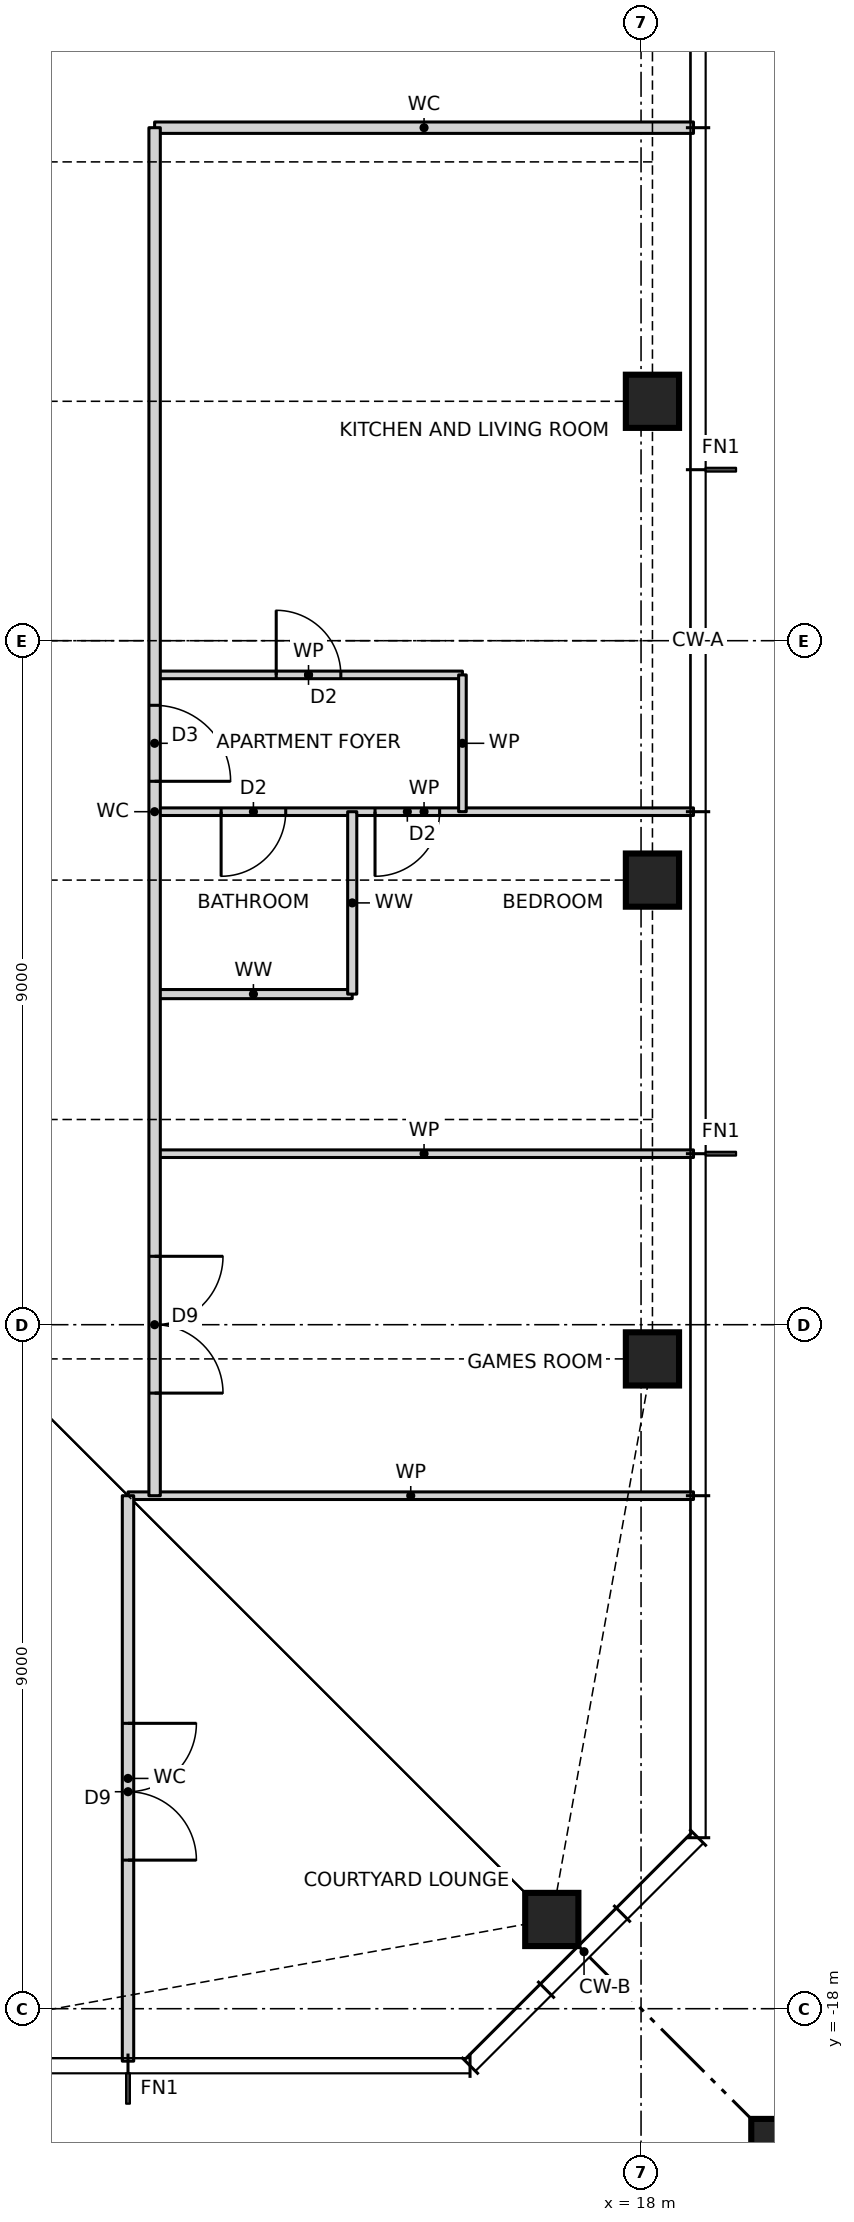
"""IFC4 building model, lengths in metres.
Left out: names, types, materials, properties, quantities, classifications, styles, units other than length and angle.
Written with IfcOpenShell. Run it as: python <this file> out.ifc"""

import sys

from ifc_helpers import new_model, si_unit, direction, frame, frame_2d, origin, origin_2d, place, context, subcontext, project, spatial, rectangle, hollow_rectangle, i_section, extrude, element, fill, save


model = new_model("IFC4")
c1 = context("Model", 3, precision=1e-05, world=origin(), true_north=direction((0.0, 1.0)))
c2 = subcontext(c1, "Body", "Model", "MODEL_VIEW")
j1 = project(units=[si_unit("LENGTHUNIT", "METRE"), si_unit("PLANEANGLEUNIT", "RADIAN")], contexts=[c1])
p1 = place(None, origin())
s1 = spatial("IfcSite", under=j1, at=p1, CompositionType="ELEMENT")
p2 = place(p1, origin())
s2 = spatial("IfcBuilding", under=s1, at=p2, CompositionType="ELEMENT")
p3 = place(p2, frame((0.0, 0.0, 184.5)))
s3 = spatial("IfcBuildingStorey", under=s2, at=p3, CompositionType="ELEMENT", Elevation=184.5)
for number, where, z_axis, x_axis in (
    (1, (16.826, -16.826, 0.0), (0.0, 0.0, 1.0), (1.0, 0.0, 0.0)),
    (2, (18.15, -9.45, 0.0), (0.0, 0.0, 1.0), (1.0, 0.0, 0.0)),
    (3, (18.15, -3.15, 0.0), (0.0, 0.0, 1.0), (1.0, 0.0, 0.0)),
    (4, (18.15, 3.15, 0.0), (0.0, 0.0, 1.0), (1.0, 0.0, 0.0)),
):
    element("IfcColumn", number, at=place(p3, frame(where, z_axis=z_axis, x_axis=x_axis)), inside=s3, PredefinedType="COLUMN", context=c2, shape_type="SweptSolid", body=[
        extrude(hollow_rectangle(XDim=0.7, YDim=0.7, WallThickness=0.06, at=origin_2d()), origin(), (0.0, 0.0, 1.0), 3.5),
    ])
p4 = place(p3, frame((21.65, -21.65, 0.0), z_axis=(0.0, 0.0, 1.0), x_axis=(1.0, 0.0, 0.0)))
e5 = element("IfcColumn", 5, at=p4, inside=s3, PredefinedType="COLUMN", context=c2, shape_type="SweptSolid", body=[
    extrude(rectangle(XDim=4.4, YDim=4.4, at=origin_2d()), origin(), (0.0, 0.0, 1.0), 3.5),
    extrude(i_section(OverallWidth=0.478, OverallDepth=0.599, WebThickness=0.1, FlangeThickness=0.14, at=origin_2d()), origin(), (0.0, 0.0, 1.0), 3.5),
])
p5 = place(p3, frame((11.25, -11.25, 0.0), z_axis=(0.0, 0.0, 1.0), x_axis=(1.0, 0.0, 0.0)))
e6 = element("IfcWall", 6, at=p5, inside=s3, PredefinedType="PARTITIONING", context=c2, shape_type="SweptSolid", body=[
    extrude(rectangle(XDim=7.44, YDim=0.1, at=frame_2d((3.72, 0.0))), origin(), (0.0, 0.0, 1.0), 3.27),
])
p6 = place(p3, frame((11.6, -6.75, 0.0), z_axis=(0.0, 0.0, 1.0), x_axis=(1.0, 0.0, 0.0)))
e7 = element("IfcWall", 7, at=p6, inside=s3, PredefinedType="PARTITIONING", context=c2, shape_type="SweptSolid", body=[
    extrude(rectangle(XDim=7.09, YDim=0.1, at=frame_2d((3.545, 0.0))), origin(), (0.0, 0.0, 1.0), 3.27),
])
p7 = place(p3, frame((11.6, -4.65, 0.0), z_axis=(0.0, 0.0, 1.0), x_axis=(1.0, 0.0, 0.0)))
e8 = element("IfcWall", 8, at=p7, inside=s3, PredefinedType="PARTITIONING", context=c2, shape_type="SweptSolid", body=[
    extrude(rectangle(XDim=2.6, YDim=0.12, at=frame_2d((1.3, 0.0))), origin(), (0.0, 0.0, 1.0), 3.27),
])
p8 = place(p3, frame((11.6, -2.25, 0.0), z_axis=(0.0, 0.0, 1.0), x_axis=(1.0, 0.0, 0.0)))
e9 = element("IfcWall", 9, at=p8, inside=s3, PredefinedType="PARTITIONING", context=c2, shape_type="SweptSolid", body=[
    extrude(rectangle(XDim=7.09, YDim=0.1, at=frame_2d((3.545, 0.0))), origin(), (0.0, 0.0, 1.0), 3.27),
])
p9 = place(p8, frame((2.9, 0.0, 0.0)))
e10 = element("IfcOpeningElement", 10, at=p9, cuts=e9, PredefinedType="OPENING", context=c2, shape_type="SweptSolid", body=[
    extrude(rectangle(XDim=0.85, YDim=2.1, at=frame_2d((0.425, 1.05))), frame((0.0, 0.06, 0.0), z_axis=(0.0, -1.0, 0.0), x_axis=(1.0, 0.0, 0.0)), (0.0, 0.0, 1.0), 0.12),
])
p10 = place(p8, frame((0.875, 0.0, 0.0)))
e11 = element("IfcOpeningElement", 11, at=p10, cuts=e9, PredefinedType="OPENING", context=c2, shape_type="SweptSolid", body=[
    extrude(rectangle(XDim=0.85, YDim=2.1, at=frame_2d((0.425, 1.05))), frame((0.0, 0.06, 0.0), z_axis=(0.0, -1.0, 0.0), x_axis=(1.0, 0.0, 0.0)), (0.0, 0.0, 1.0), 0.12),
])
p11 = place(p3, frame((11.6, -0.45, 0.0), z_axis=(0.0, 0.0, 1.0), x_axis=(1.0, 0.0, 0.0)))
e12 = element("IfcWall", 12, at=p11, inside=s3, PredefinedType="PARTITIONING", context=c2, shape_type="SweptSolid", body=[
    extrude(rectangle(XDim=4.05, YDim=0.1, at=frame_2d((2.025, 0.0))), origin(), (0.0, 0.0, 1.0), 3.27),
])
p12 = place(p11, frame((1.6, 0.0, 0.0)))
e13 = element("IfcOpeningElement", 13, at=p12, cuts=e12, PredefinedType="OPENING", context=c2, shape_type="SweptSolid", body=[
    extrude(rectangle(XDim=0.85, YDim=2.1, at=frame_2d((0.425, 1.05))), frame((0.0, 0.06, 0.0), z_axis=(0.0, -1.0, 0.0), x_axis=(1.0, 0.0, 0.0)), (0.0, 0.0, 1.0), 0.12),
])
p13 = place(p3, frame((11.6, 6.75, 0.0), z_axis=(0.0, 0.0, 1.0), x_axis=(1.0, 0.0, 0.0)))
e14 = element("IfcWall", 14, at=p13, inside=s3, PredefinedType="PARTITIONING", context=c2, shape_type="SweptSolid", body=[
    extrude(rectangle(XDim=7.09, YDim=0.15, at=frame_2d((3.545, 0.0))), origin(), (0.0, 0.0, 1.0), 3.27),
])
p14 = place(p3, frame((15.65, -2.25, 0.0), z_axis=(0.0, 0.0, 1.0), x_axis=(0.0, 1.0, 0.0)))
e15 = element("IfcWall", 15, at=p14, inside=s3, PredefinedType="PARTITIONING", context=c2, shape_type="SweptSolid", body=[
    extrude(rectangle(XDim=1.8, YDim=0.1, at=frame_2d((0.9, 0.0))), origin(), (0.0, 0.0, 1.0), 3.27),
])
p15 = place(p3, frame((14.2, -4.65, 0.0), z_axis=(0.0, 0.0, 1.0), x_axis=(0.0, 1.0, 0.0)))
e16 = element("IfcWall", 16, at=p15, inside=s3, PredefinedType="PARTITIONING", context=c2, shape_type="SweptSolid", body=[
    extrude(rectangle(XDim=2.4, YDim=0.12, at=frame_2d((1.2, 0.0))), origin(), (0.0, 0.0, 1.0), 3.27),
])
p16 = place(p3, frame((11.6, -11.25, 0.0), z_axis=(0.0, 0.0, 1.0), x_axis=(0.0, 1.0, 0.0)))
e17 = element("IfcWall", 17, at=p16, inside=s3, PredefinedType="PARTITIONING", context=c2, shape_type="SweptSolid", body=[
    extrude(rectangle(XDim=18.0, YDim=0.15, at=frame_2d((9.0, 0.0))), origin(), (0.0, 0.0, 1.0), 3.27),
])
p17 = place(p16, frame((1.35, 0.0, 0.0)))
e18 = element("IfcOpeningElement", 18, at=p17, cuts=e17, PredefinedType="OPENING", context=c2, shape_type="SweptSolid", body=[
    extrude(rectangle(XDim=1.8, YDim=2.1, at=frame_2d((0.9, 1.05))), frame((0.0, 0.085, 0.0), z_axis=(0.0, -1.0, 0.0), x_axis=(1.0, 0.0, 0.0)), (0.0, 0.0, 1.0), 0.17),
])
p18 = place(p16, frame((9.4, 0.0, 0.0)))
e19 = element("IfcOpeningElement", 19, at=p18, cuts=e17, PredefinedType="OPENING", context=c2, shape_type="SweptSolid", body=[
    extrude(rectangle(XDim=1.0, YDim=2.1, at=frame_2d((0.5, 1.05))), frame((0.0, 0.085, 0.0), z_axis=(0.0, -1.0, 0.0), x_axis=(1.0, 0.0, 0.0)), (0.0, 0.0, 1.0), 0.17),
])
p19 = place(p3, frame((11.25, -18.69, 0.0), z_axis=(0.0, 0.0, 1.0), x_axis=(0.0, 1.0, 0.0)))
e20 = element("IfcWall", 20, at=p19, inside=s3, PredefinedType="PARTITIONING", context=c2, shape_type="SweptSolid", body=[
    extrude(rectangle(XDim=7.44, YDim=0.15, at=frame_2d((3.72, 0.0))), origin(), (0.0, 0.0, 1.0), 3.27),
])
p20 = place(p19, frame((2.645, 0.0, 0.0)))
e21 = element("IfcOpeningElement", 21, at=p20, cuts=e20, PredefinedType="OPENING", context=c2, shape_type="SweptSolid", body=[
    extrude(rectangle(XDim=1.8, YDim=2.1, at=frame_2d((0.9, 1.05))), frame((0.0, 0.085, 0.0), z_axis=(0.0, -1.0, 0.0), x_axis=(1.0, 0.0, 0.0)), (0.0, 0.0, 1.0), 0.17),
])
p21 = place(p17, frame((1.8, 0.0, 0.0), z_axis=(0.0, 0.0, 1.0), x_axis=(-1.0, 0.0, 0.0)))
e22 = element("IfcDoor", 22, at=p21, inside=s3, OperationType="DOUBLE_DOOR_SINGLE_SWING", PredefinedType="DOOR", context=c2, shape_type="SweptSolid", body=[
    extrude(rectangle(XDim=1.8, YDim=2.1, at=frame_2d((0.9, 1.05))), frame((0.0, 0.025, 0.0), z_axis=(0.0, -1.0, 0.0), x_axis=(1.0, 0.0, 0.0)), (0.0, 0.0, 1.0), 0.05),
])
fill(e18, e22)
p22 = place(p18, frame((1.0, 0.0, 0.0), z_axis=(0.0, 0.0, 1.0), x_axis=(-1.0, 0.0, 0.0)))
e23 = element("IfcDoor", 23, at=p22, inside=s3, OperationType="SINGLE_SWING_RIGHT", PredefinedType="DOOR", context=c2, shape_type="SweptSolid", body=[
    extrude(rectangle(XDim=1.0, YDim=2.1, at=frame_2d((0.5, 1.05))), frame((0.0, 0.025, 0.0), z_axis=(0.0, -1.0, 0.0), x_axis=(1.0, 0.0, 0.0)), (0.0, 0.0, 1.0), 0.05),
])
fill(e19, e23)
p23 = place(p12, origin())
e24 = element("IfcDoor", 24, at=p23, inside=s3, OperationType="SINGLE_SWING_LEFT", PredefinedType="DOOR", context=c2, shape_type="SweptSolid", body=[
    extrude(rectangle(XDim=0.85, YDim=2.1, at=frame_2d((0.425, 1.05))), frame((0.0, 0.025, 0.0), z_axis=(0.0, -1.0, 0.0), x_axis=(1.0, 0.0, 0.0)), (0.0, 0.0, 1.0), 0.05),
])
fill(e13, e24)
p24 = place(p9, frame((0.85, 0.0, 0.0), z_axis=(0.0, 0.0, 1.0), x_axis=(-1.0, 0.0, 0.0)))
e25 = element("IfcDoor", 25, at=p24, inside=s3, OperationType="SINGLE_SWING_RIGHT", PredefinedType="DOOR", context=c2, shape_type="SweptSolid", body=[
    extrude(rectangle(XDim=0.85, YDim=2.1, at=frame_2d((0.425, 1.05))), frame((0.0, 0.025, 0.0), z_axis=(0.0, -1.0, 0.0), x_axis=(1.0, 0.0, 0.0)), (0.0, 0.0, 1.0), 0.05),
])
fill(e10, e25)
p25 = place(p10, frame((0.85, 0.0, 0.0), z_axis=(0.0, 0.0, 1.0), x_axis=(-1.0, 0.0, 0.0)))
e26 = element("IfcDoor", 26, at=p25, inside=s3, OperationType="SINGLE_SWING_RIGHT", PredefinedType="DOOR", context=c2, shape_type="SweptSolid", body=[
    extrude(rectangle(XDim=0.85, YDim=2.1, at=frame_2d((0.425, 1.05))), frame((0.0, 0.025, 0.0), z_axis=(0.0, -1.0, 0.0), x_axis=(1.0, 0.0, 0.0)), (0.0, 0.0, 1.0), 0.05),
])
fill(e11, e26)
p26 = place(p20, frame((1.8, 0.0, 0.0), z_axis=(0.0, 0.0, 1.0), x_axis=(-1.0, 0.0, 0.0)))
e27 = element("IfcDoor", 27, at=p26, inside=s3, OperationType="DOUBLE_DOOR_SINGLE_SWING", PredefinedType="DOOR", context=c2, shape_type="SweptSolid", body=[
    extrude(rectangle(XDim=1.8, YDim=2.1, at=frame_2d((0.9, 1.05))), frame((0.0, 0.025, 0.0), z_axis=(0.0, -1.0, 0.0), x_axis=(1.0, 0.0, 0.0)), (0.0, 0.0, 1.0), 0.05),
])
fill(e21, e27)
save(model, sys.argv[1])
